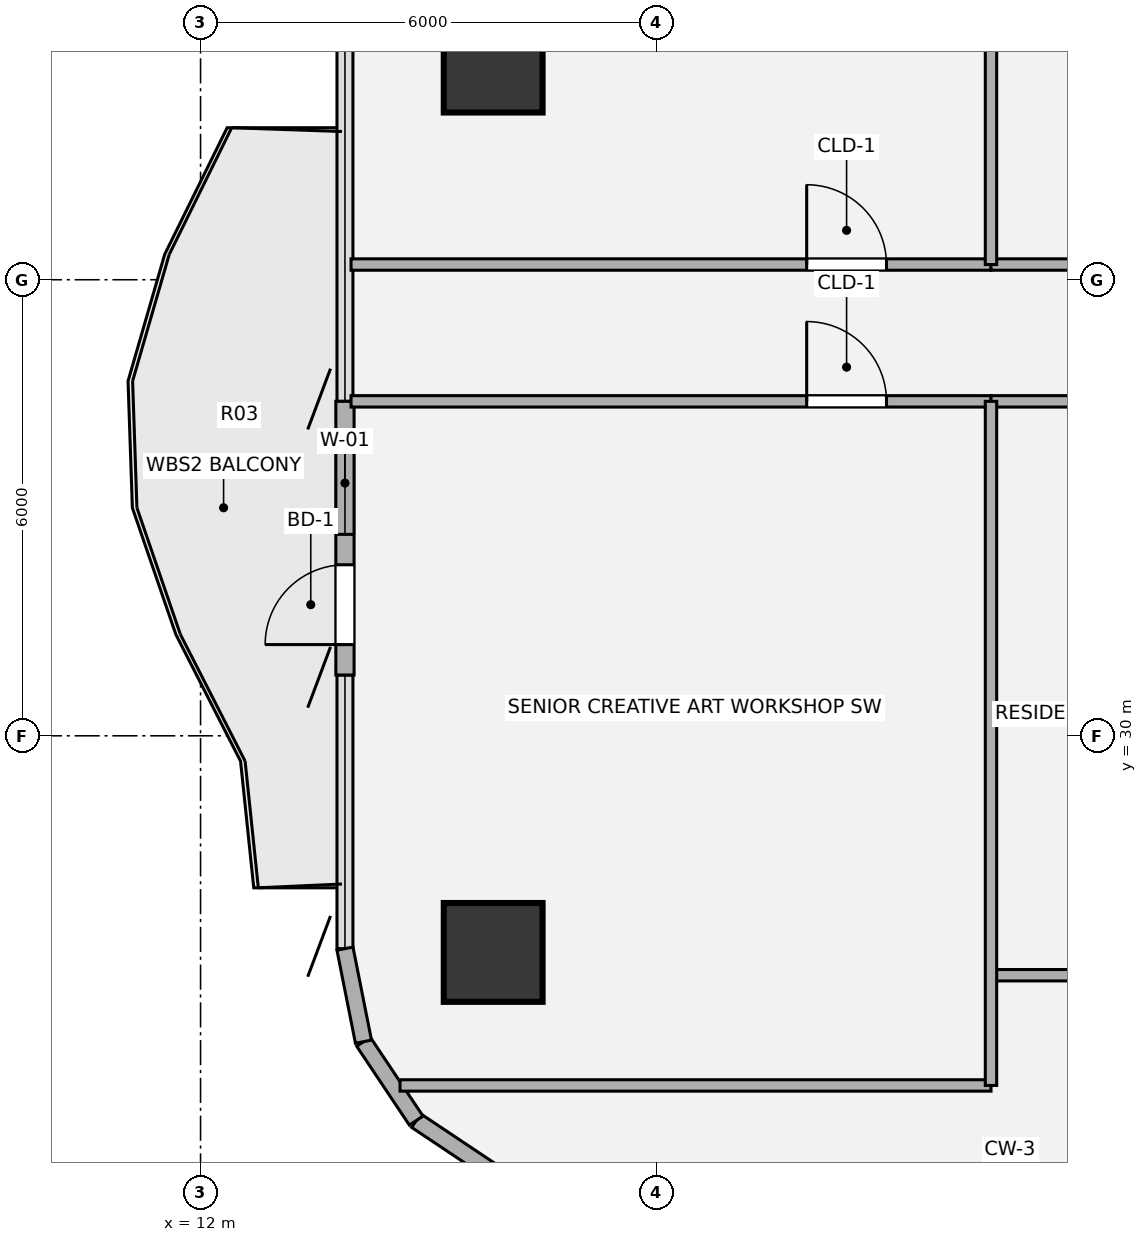
"""IFC4 building model, lengths in metres.
Left out: names, types, materials, properties, quantities, classifications, styles, units other than length and angle.
Written with IfcOpenShell. Run it as: python <this file> out.ifc"""

import sys

from ifc_helpers import new_model, si_unit, direction, frame, frame_2d, origin, origin_2d, place, context, subcontext, project, spatial, rectangle, hollow_circle, extrude, source, transform, mapped, element, fill, save


model = new_model("IFC4")
c1 = context("Model", 3, precision=1e-05, world=origin(), true_north=direction((0.0, 1.0)))
c2 = subcontext(c1, "Body", "Model", "MODEL_VIEW")
j1 = project(units=[si_unit("LENGTHUNIT", "METRE"), si_unit("PLANEANGLEUNIT", "RADIAN")], contexts=[c1])
p1 = place(None, origin())
s1 = spatial("IfcSite", under=j1, at=p1, CompositionType="ELEMENT")
p2 = place(p1, origin())
s2 = spatial("IfcBuilding", under=s1, at=p2, CompositionType="ELEMENT")
p3 = place(p2, frame((0.0, 0.0, 120.06)))
s3 = spatial("IfcBuildingStorey", under=s2, at=p3, CompositionType="ELEMENT", Elevation=120.06)
m1 = source(origin(), c2, "Body", "SweptSolid", [
    extrude(hollow_circle(Radius=0.65, WallThickness=0.045, at=origin_2d()), origin(), (0.0, 0.0, 1.0), 3.78),
])
for number, where, z_axis, x_axis in (
    (1, (15.85, 27.15, 0.0), (0.0, 0.0, 1.0), (1.0, 0.0, 0.0)),
    (2, (15.85, 38.85, 0.0), (0.0, 0.0, 1.0), (1.0, 0.0, 0.0)),
):
    element("IfcColumn", number, at=place(p3, frame(where, z_axis=z_axis, x_axis=x_axis)), inside=s3, PredefinedType="COLUMN", context=c2, shape_type="MappedRepresentation", body=[
        mapped(m1, transform((0.0, 0.0, 0.0), x_axis=(1.0, 0.0, 0.0), y_axis=(0.0, 1.0, 0.0), z_axis=(0.0, 0.0, 1.0), scale=1.0)),
    ])
for number, where, z_axis, x_axis in (
    (3, (15.875, 24.244, 0.0), (0.0, 0.0, 1.0), (-0.831, 0.556, 0.0)),
    (4, (14.837, 24.937, 0.0), (0.0, 0.0, 1.0), (-0.556, 0.831, 0.0)),
    (5, (14.144, 25.975, 0.0), (0.0, 0.0, 1.0), (-0.195, 0.981, 0.0)),
):
    element("IfcWall", number, at=place(p3, frame(where, z_axis=z_axis, x_axis=x_axis)), inside=s3, PredefinedType="SOLIDWALL", context=c2, shape_type="SweptSolid", body=[
        extrude(rectangle(XDim=1.249, YDim=0.215, at=frame_2d((0.624, 0.0))), origin(), (0.0, 0.0, 1.0), 3.53),
    ])
p4 = place(p3, frame((13.9, 30.8, 0.0), z_axis=(0.0, 0.0, 1.0), x_axis=(0.0, 1.0, 0.0)))
e6 = element("IfcWall", 6, at=p4, inside=s3, PredefinedType="SOLIDWALL", context=c2, shape_type="SweptSolid", body=[
    extrude(rectangle(XDim=3.6, YDim=0.24, at=frame_2d((1.8, 0.0))), origin(), (0.0, 0.0, 1.0), 3.53),
])
p5 = place(p4, frame((0.4, 0.0, 0.0)))
e7 = element("IfcOpeningElement", 7, at=p5, cuts=e6, PredefinedType="OPENING", context=c2, shape_type="SweptSolid", body=[
    extrude(rectangle(XDim=1.05, YDim=2.15, at=origin_2d()), frame((0.525, 0.13, 1.075), z_axis=(0.0, -1.0, 0.0), x_axis=(1.0, 0.0, 0.0)), (0.0, 0.0, 1.0), 0.26),
])
p6 = place(p4, frame((1.85, 0.0, 0.85)))
e8 = element("IfcOpeningElement", 8, at=p6, cuts=e6, PredefinedType="OPENING", context=c2, shape_type="SweptSolid", body=[
    extrude(rectangle(XDim=1.35, YDim=1.35, at=origin_2d()), frame((0.675, 0.13, 0.675), z_axis=(0.0, -1.0, 0.0), x_axis=(1.0, 0.0, 0.0)), (0.0, 0.0, 1.0), 0.26),
])
p7 = place(p3, frame((14.624, 25.4, 0.0), z_axis=(0.0, 0.0, 1.0), x_axis=(1.0, 0.0, 0.0)))
e9 = element("IfcWall", 9, at=p7, inside=s3, PredefinedType="PARTITIONING", context=c2, shape_type="SweptSolid", body=[
    extrude(rectangle(XDim=7.776, YDim=0.15, at=frame_2d((3.888, 0.0))), origin(), (0.0, 0.0, 1.0), 3.5),
])
p8 = place(p3, frame((22.4, 26.85, 0.0), z_axis=(0.0, 0.0, 1.0), x_axis=(1.0, 0.0, 0.0)))
e10 = element("IfcWall", 10, at=p8, inside=s3, PredefinedType="PARTITIONING", context=c2, shape_type="SweptSolid", body=[
    extrude(rectangle(XDim=5.588, YDim=0.15, at=frame_2d((2.794, 0.0))), origin(), (0.0, 0.0, 1.0), 3.055),
])
p9 = place(p3, frame((13.98, 34.4, 0.0), z_axis=(0.0, 0.0, 1.0), x_axis=(1.0, 0.0, 0.0)))
e11 = element("IfcWall", 11, at=p9, inside=s3, PredefinedType="PARTITIONING", context=c2, shape_type="SweptSolid", body=[
    extrude(rectangle(XDim=8.42, YDim=0.15, at=frame_2d((4.21, 0.0))), origin(), (0.0, 0.0, 1.0), 2.982),
])
p10 = place(p9, frame((5.995, 0.0, 0.0)))
e12 = element("IfcOpeningElement", 12, at=p10, cuts=e11, PredefinedType="OPENING", context=c2, shape_type="SweptSolid", body=[
    extrude(rectangle(XDim=1.05, YDim=2.1, at=origin_2d()), frame((0.525, 0.085, 1.05), z_axis=(0.0, -1.0, 0.0), x_axis=(1.0, 0.0, 0.0)), (0.0, 0.0, 1.0), 0.17),
])
p11 = place(p3, frame((22.4, 34.4, 0.0), z_axis=(0.0, 0.0, 1.0), x_axis=(1.0, 0.0, 0.0)))
e13 = element("IfcWall", 13, at=p11, inside=s3, PredefinedType="PARTITIONING", context=c2, shape_type="SweptSolid", body=[
    extrude(rectangle(XDim=5.588, YDim=0.15, at=frame_2d((2.794, 0.0))), origin(), (0.0, 0.0, 1.0), 2.982),
])
p12 = place(p11, frame((2.334, 0.0, 0.0)))
e14 = element("IfcOpeningElement", 14, at=p12, cuts=e13, PredefinedType="OPENING", context=c2, shape_type="SweptSolid", body=[
    extrude(rectangle(XDim=0.86, YDim=2.1, at=origin_2d()), frame((0.43, 0.085, 1.05), z_axis=(0.0, -1.0, 0.0), x_axis=(1.0, 0.0, 0.0)), (0.0, 0.0, 1.0), 0.17),
])
p13 = place(p3, frame((13.98, 36.2, 0.0), z_axis=(0.0, 0.0, 1.0), x_axis=(1.0, 0.0, 0.0)))
e15 = element("IfcWall", 15, at=p13, inside=s3, PredefinedType="PARTITIONING", context=c2, shape_type="SweptSolid", body=[
    extrude(rectangle(XDim=8.42, YDim=0.15, at=frame_2d((4.21, 0.0))), origin(), (0.0, 0.0, 1.0), 2.982),
])
p14 = place(p13, frame((5.995, 0.0, 0.0)))
e16 = element("IfcOpeningElement", 16, at=p14, cuts=e15, PredefinedType="OPENING", context=c2, shape_type="SweptSolid", body=[
    extrude(rectangle(XDim=1.05, YDim=2.1, at=origin_2d()), frame((0.525, 0.085, 1.05), z_axis=(0.0, -1.0, 0.0), x_axis=(1.0, 0.0, 0.0)), (0.0, 0.0, 1.0), 0.17),
])
p15 = place(p3, frame((22.4, 36.2, 0.0), z_axis=(0.0, 0.0, 1.0), x_axis=(1.0, 0.0, 0.0)))
e17 = element("IfcWall", 17, at=p15, inside=s3, PredefinedType="PARTITIONING", context=c2, shape_type="SweptSolid", body=[
    extrude(rectangle(XDim=5.588, YDim=0.15, at=frame_2d((2.794, 0.0))), origin(), (0.0, 0.0, 1.0), 2.982),
])
p16 = place(p15, frame((2.334, 0.0, 0.0)))
e18 = element("IfcOpeningElement", 18, at=p16, cuts=e17, PredefinedType="OPENING", context=c2, shape_type="SweptSolid", body=[
    extrude(rectangle(XDim=0.86, YDim=2.1, at=origin_2d()), frame((0.43, 0.085, 1.05), z_axis=(0.0, -1.0, 0.0), x_axis=(1.0, 0.0, 0.0)), (0.0, 0.0, 1.0), 0.17),
])
p17 = place(p3, frame((22.4, 25.4, 0.0), z_axis=(0.0, 0.0, 1.0), x_axis=(0.0, 1.0, 0.0)))
e19 = element("IfcWall", 19, at=p17, inside=s3, PredefinedType="PARTITIONING", context=c2, shape_type="SweptSolid", body=[
    extrude(rectangle(XDim=9.0, YDim=0.15, at=frame_2d((4.5, 0.0))), origin(), (0.0, 0.0, 1.0), 3.5),
])
p18 = place(p3, frame((22.4, 36.2, 0.0), z_axis=(0.0, 0.0, 1.0), x_axis=(0.0, 1.0, 0.0)))
e20 = element("IfcWall", 20, at=p18, inside=s3, PredefinedType="PARTITIONING", context=c2, shape_type="SweptSolid", body=[
    extrude(rectangle(XDim=11.121, YDim=0.15, at=frame_2d((5.561, 0.0))), origin(), (0.0, 0.0, 1.0), 3.5),
])
m2 = source(origin(), c2, "Body", "SweptSolid", [
    extrude(rectangle(XDim=1.05, YDim=2.15, at=origin_2d()), frame((0.525, 0.025, 1.075), z_axis=(0.0, -1.0, 0.0), x_axis=(1.0, 0.0, 0.0)), (0.0, 0.0, 1.0), 0.05),
])
p19 = place(p5, origin())
e21 = element("IfcDoor", 21, at=p19, inside=s3, OperationType="SINGLE_SWING_LEFT", PredefinedType="DOOR", context=c2, shape_type="MappedRepresentation", body=[
    mapped(m2, transform((0.0, 0.0, 0.0), x_axis=(1.0, 0.0, 0.0), y_axis=(0.0, 1.0, 0.0), z_axis=(0.0, 0.0, 1.0), scale=1.0)),
])
fill(e7, e21)
m3 = source(origin(), c2, "Body", "SweptSolid", [
    extrude(rectangle(XDim=1.35, YDim=1.35, at=origin_2d()), frame((0.675, 0.03, 0.675), z_axis=(0.0, -1.0, 0.0), x_axis=(1.0, 0.0, 0.0)), (0.0, 0.0, 1.0), 0.06),
])
p20 = place(p6, origin())
e22 = element("IfcWindow", 22, at=p20, inside=s3, PartitioningType="SINGLE_PANEL", PredefinedType="WINDOW", context=c2, shape_type="MappedRepresentation", body=[
    mapped(m3, transform((0.0, 0.0, 0.0), x_axis=(1.0, 0.0, 0.0), y_axis=(0.0, 1.0, 0.0), z_axis=(0.0, 0.0, 1.0), scale=1.0)),
])
fill(e8, e22)
m4 = source(origin(), c2, "Body", "SweptSolid", [
    extrude(rectangle(XDim=1.05, YDim=2.1, at=origin_2d()), frame((0.525, 0.025, 1.05), z_axis=(0.0, -1.0, 0.0), x_axis=(1.0, 0.0, 0.0)), (0.0, 0.0, 1.0), 0.05),
])
p21 = place(p10, origin())
e23 = element("IfcDoor", 23, at=p21, inside=s3, OperationType="SINGLE_SWING_LEFT", PredefinedType="DOOR", context=c2, shape_type="MappedRepresentation", body=[
    mapped(m4, transform((0.0, 0.0, 0.0), x_axis=(1.0, 0.0, 0.0), y_axis=(0.0, 1.0, 0.0), z_axis=(0.0, 0.0, 1.0), scale=1.0)),
])
fill(e12, e23)
p22 = place(p14, origin())
e24 = element("IfcDoor", 24, at=p22, inside=s3, OperationType="SINGLE_SWING_LEFT", PredefinedType="DOOR", context=c2, shape_type="MappedRepresentation", body=[
    mapped(m4, transform((0.0, 0.0, 0.0), x_axis=(1.0, 0.0, 0.0), y_axis=(0.0, 1.0, 0.0), z_axis=(0.0, 0.0, 1.0), scale=1.0)),
])
fill(e16, e24)
save(model, sys.argv[1])
